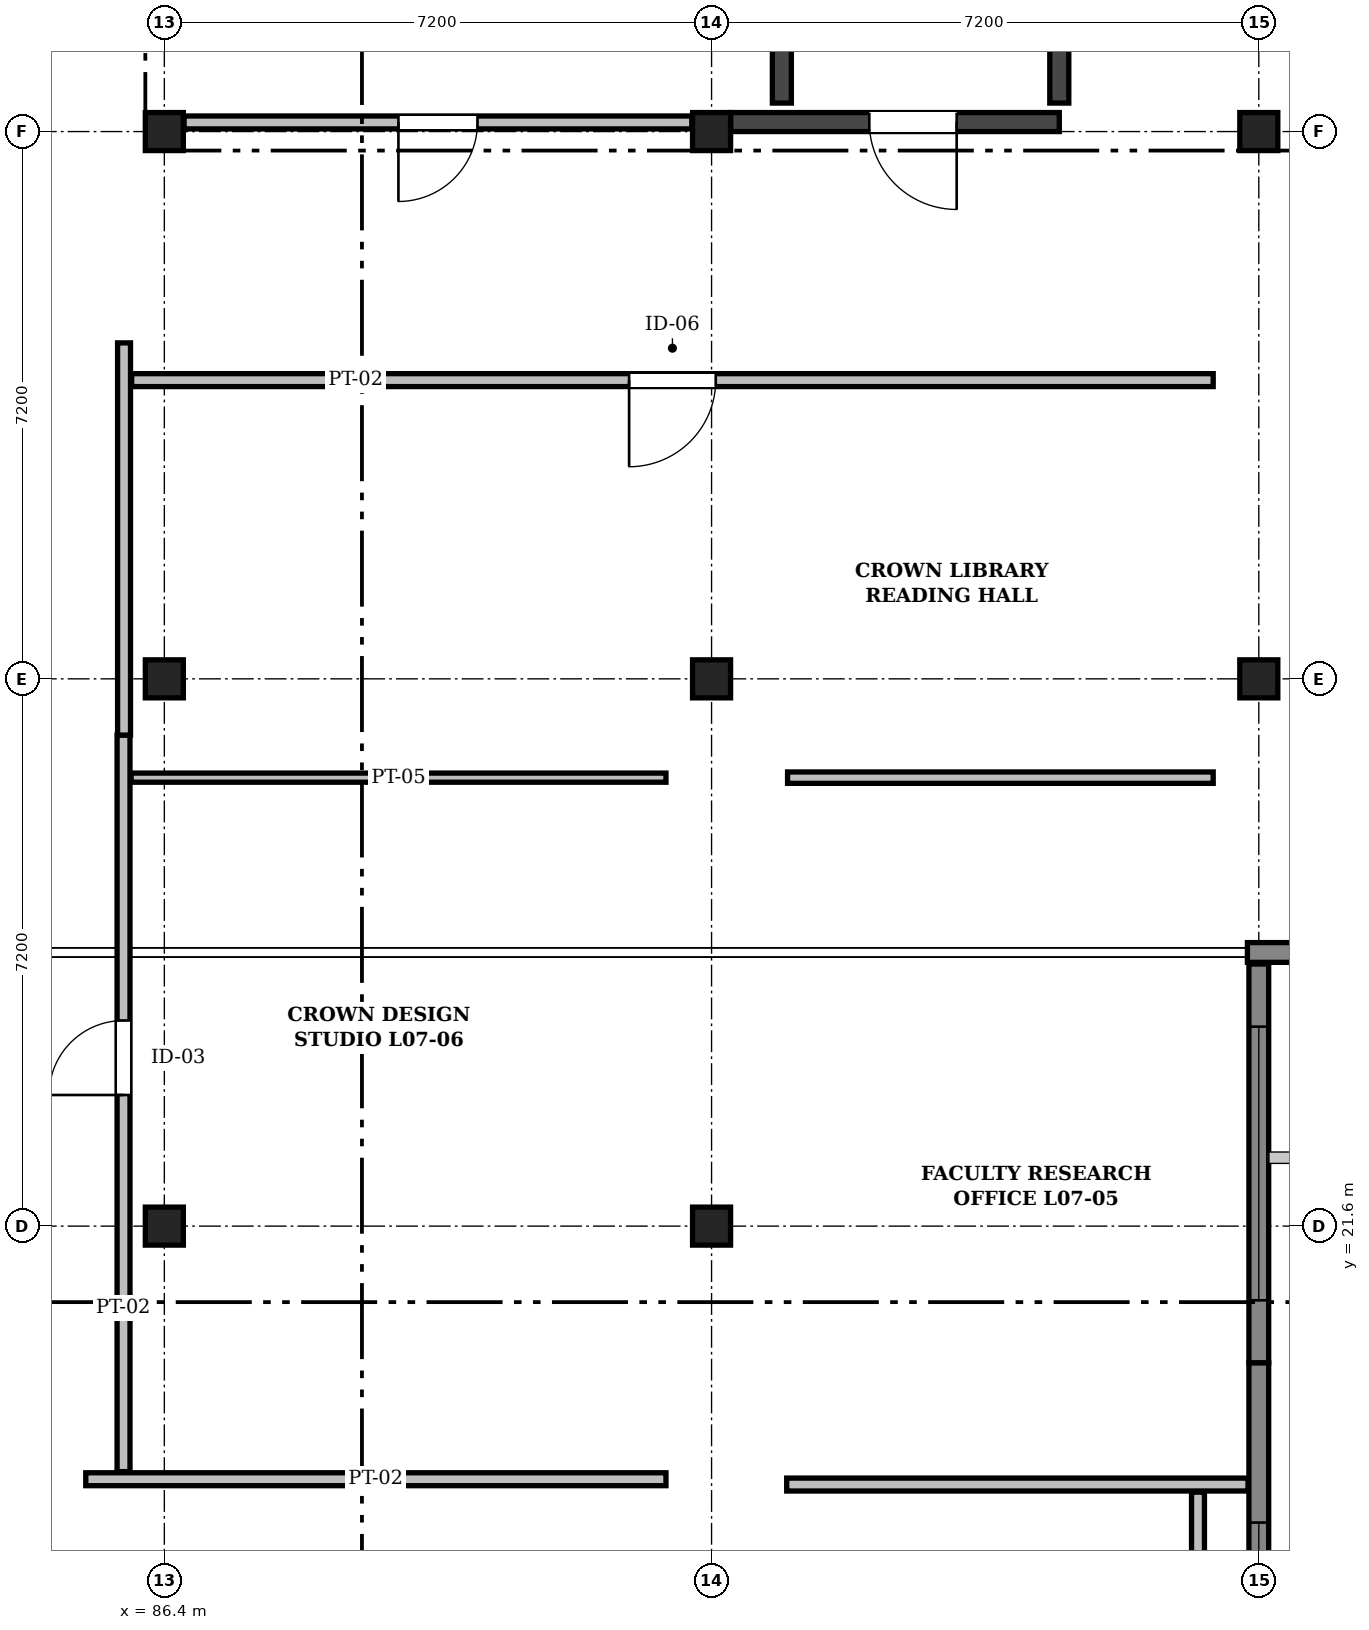
"""IFC4 building model, lengths in metres.
Left out: names, types, materials, properties, quantities, classifications, styles, units other than length and angle.
Written with IfcOpenShell. Run it as: python <this file> out.ifc"""

import sys

from ifc_helpers import new_model, si_unit, direction, frame, frame_2d, origin, origin_2d, place, context, subcontext, project, spatial, rectangle, extrude, element, fill, save


model = new_model("IFC4")
c1 = context("Model", 3, precision=1e-05, world=origin(), true_north=direction((0.0, 1.0)))
c2 = subcontext(c1, "Body", "Model", "MODEL_VIEW")
j1 = project(units=[si_unit("LENGTHUNIT", "METRE"), si_unit("PLANEANGLEUNIT", "RADIAN")], contexts=[c1])
p1 = place(None, origin())
s1 = spatial("IfcSite", under=j1, at=p1, CompositionType="ELEMENT")
p2 = place(p1, origin())
s2 = spatial("IfcBuilding", under=s1, at=p2, CompositionType="ELEMENT")
p3 = place(p2, frame((0.0, 0.0, 32.4)))
s3 = spatial("IfcBuildingStorey", under=s2, at=p3, CompositionType="ELEMENT", Elevation=32.4)
for number, where, z_axis, x_axis in (
    (1, (86.4, 21.6, 0.0), (0.0, 0.0, 1.0), (1.0, 0.0, 0.0)),
    (2, (86.4, 28.8, 0.0), (0.0, 0.0, 1.0), (1.0, 0.0, 0.0)),
    (3, (86.4, 36.0, 0.0), (0.0, 0.0, 1.0), (1.0, 0.0, 0.0)),
    (4, (93.6, 21.6, 0.0), (0.0, 0.0, 1.0), (1.0, 0.0, 0.0)),
    (5, (93.6, 28.8, 0.0), (0.0, 0.0, 1.0), (1.0, 0.0, 0.0)),
    (6, (93.6, 36.0, 0.0), (0.0, 0.0, 1.0), (1.0, 0.0, 0.0)),
    (7, (100.8, 28.8, 0.0), (0.0, 0.0, 1.0), (1.0, 0.0, 0.0)),
    (8, (100.8, 36.0, 0.0), (0.0, 0.0, 1.0), (1.0, 0.0, 0.0)),
):
    element("IfcColumn", number, at=place(p3, frame(where, z_axis=z_axis, x_axis=x_axis)), inside=s3, PredefinedType="COLUMN", context=c2, shape_type="SweptSolid", body=[
        extrude(rectangle(XDim=0.5, YDim=0.5, at=origin_2d()), origin(), (0.0, 0.0, 1.0), 4.5),
    ])
p4 = place(p3, frame((104.55, 25.2, 0.0), z_axis=(0.0, 0.0, 1.0), x_axis=(-1.0, 0.0, 0.0)))
e9 = element("IfcWall", 9, at=p4, inside=s3, PredefinedType="SOLIDWALL", context=c2, shape_type="SweptSolid", body=[
    extrude(rectangle(XDim=3.9, YDim=0.26, at=frame_2d((1.95, 0.0))), origin(), (0.0, 0.0, 1.0), 4.22),
])
p5 = place(p3, frame((100.8, 25.048, 0.0), z_axis=(0.0, 0.0, 1.0), x_axis=(0.0, -1.0, 0.0)))
e10 = element("IfcWall", 10, at=p5, inside=s3, PredefinedType="SOLIDWALL", context=c2, shape_type="SweptSolid", body=[
    extrude(rectangle(XDim=5.248, YDim=0.26, at=frame_2d((2.624, 0.0))), origin(), (0.0, 0.0, 1.0), 4.22),
])
p6 = place(p5, frame((0.824, 0.0, 0.95)))
e11 = element("IfcOpeningElement", 11, at=p6, cuts=e10, PredefinedType="OPENING", context=c2, shape_type="SweptSolid", body=[
    extrude(rectangle(XDim=3.6, YDim=1.55, at=frame_2d((1.8, 0.775))), frame((0.0, 0.142, 0.0), z_axis=(0.0, -1.0, 0.0), x_axis=(1.0, 0.0, 0.0)), (0.0, 0.0, 1.0), 0.284),
])
p7 = place(p3, frame((100.8, 19.8, 0.0), z_axis=(0.0, 0.0, 1.0), x_axis=(0.0, -1.0, 0.0)))
e12 = element("IfcWall", 12, at=p7, inside=s3, PredefinedType="SOLIDWALL", context=c2, shape_type="SweptSolid", body=[
    extrude(rectangle(XDim=5.4, YDim=0.26, at=frame_2d((2.7, 0.0))), origin(), (0.0, 0.0, 1.0), 4.22),
])
p8 = place(p7, frame((2.1, 0.0, 0.95)))
e13 = element("IfcOpeningElement", 13, at=p8, cuts=e12, PredefinedType="OPENING", context=c2, shape_type="SweptSolid", body=[
    extrude(rectangle(XDim=1.2, YDim=1.8, at=frame_2d((0.6, 0.9))), frame((0.0, 0.142, 0.0), z_axis=(0.0, -1.0, 0.0), x_axis=(1.0, 0.0, 0.0)), (0.0, 0.0, 1.0), 0.284),
])
p9 = place(p3, frame((93.85, 36.125, 0.0), z_axis=(0.0, 0.0, 1.0), x_axis=(1.0, 0.0, 0.0)))
e14 = element("IfcWall", 14, at=p9, inside=s3, PredefinedType="SHEAR", context=c2, shape_type="SweptSolid", body=[
    extrude(rectangle(XDim=4.325, YDim=0.25, at=frame_2d((2.163, 0.0))), origin(), (0.0, 0.0, 1.0), 4.25),
])
p10 = place(p9, frame((1.825, 0.0, 0.0)))
e15 = element("IfcOpeningElement", 15, at=p10, cuts=e14, PredefinedType="OPENING", context=c2, shape_type="SweptSolid", body=[
    extrude(rectangle(XDim=1.15, YDim=2.15, at=frame_2d((0.575, 1.075))), frame((0.0, 0.137, 0.0), z_axis=(0.0, -1.0, 0.0), x_axis=(1.0, 0.0, 0.0)), (0.0, 0.0, 1.0), 0.274),
])
p11 = place(p3, frame((94.525, 36.375, 0.0), z_axis=(0.0, 0.0, 1.0), x_axis=(0.0, 1.0, 0.0)))
e16 = element("IfcWall", 16, at=p11, inside=s3, PredefinedType="SHEAR", context=c2, shape_type="SweptSolid", body=[
    extrude(rectangle(XDim=2.77, YDim=0.25, at=frame_2d((1.385, 0.0))), origin(), (0.0, 0.0, 1.0), 4.25),
])
p12 = place(p3, frame((98.175, 36.375, 0.0), z_axis=(0.0, 0.0, 1.0), x_axis=(0.0, 1.0, 0.0)))
e17 = element("IfcWall", 17, at=p12, inside=s3, PredefinedType="SHEAR", context=c2, shape_type="SweptSolid", body=[
    extrude(rectangle(XDim=3.225, YDim=0.25, at=frame_2d((1.613, 0.0))), origin(), (0.0, 0.0, 1.0), 4.25),
])
p13 = place(p3, frame((94.588, 18.2, 0.0), z_axis=(0.0, 0.0, 1.0), x_axis=(1.0, 0.0, 0.0)))
e18 = element("IfcWall", 18, at=p13, inside=s3, PredefinedType="PARTITIONING", context=c2, shape_type="SweptSolid", body=[
    extrude(rectangle(XDim=6.07, YDim=0.17, at=frame_2d((3.035, 0.0))), origin(), (0.0, 0.0, 1.0), 4.16),
])
p14 = place(p3, frame((100.0, 14.36, 0.0), z_axis=(0.0, 0.0, 1.0), x_axis=(0.0, 1.0, 0.0)))
e19 = element("IfcWall", 19, at=p14, inside=s3, PredefinedType="PARTITIONING", context=c2, shape_type="SweptSolid", body=[
    extrude(rectangle(XDim=3.74, YDim=0.17, at=frame_2d((1.87, 0.0))), origin(), (0.0, 0.0, 1.0), 4.16),
])
p15 = place(p14, frame((1.62, 0.0, 0.0)))
e20 = element("IfcOpeningElement", 20, at=p15, cuts=e19, PredefinedType="OPENING", context=c2, shape_type="SweptSolid", body=[
    extrude(rectangle(XDim=0.9, YDim=2.08, at=frame_2d((0.45, 1.04))), frame((0.0, 0.097, 0.0), z_axis=(0.0, -1.0, 0.0), x_axis=(1.0, 0.0, 0.0)), (0.0, 0.0, 1.0), 0.194),
])
p16 = place(p3, frame((85.366, 18.27, 0.0), z_axis=(0.0, 0.0, 1.0), x_axis=(1.0, 0.0, 0.0)))
e21 = element("IfcWall", 21, at=p16, inside=s3, PredefinedType="PARTITIONING", context=c2, shape_type="SweptSolid", body=[
    extrude(rectangle(XDim=7.634, YDim=0.17, at=frame_2d((3.817, 0.0))), origin(), (0.0, 0.0, 1.0), 4.16),
])
p17 = place(p3, frame((85.863, 18.37, 0.0), z_axis=(0.0, 0.0, 1.0), x_axis=(0.0, 1.0, 0.0)))
e22 = element("IfcWall", 22, at=p17, inside=s3, PredefinedType="PARTITIONING", context=c2, shape_type="SweptSolid", body=[
    extrude(rectangle(XDim=9.69, YDim=0.17, at=frame_2d((4.845, 0.0))), origin(), (0.0, 0.0, 1.0), 4.16),
])
p18 = place(p17, frame((4.955, 0.0, 0.0)))
e23 = element("IfcOpeningElement", 23, at=p18, cuts=e22, PredefinedType="OPENING", context=c2, shape_type="SweptSolid", body=[
    extrude(rectangle(XDim=0.98, YDim=2.14, at=frame_2d((0.49, 1.07))), frame((0.0, 0.097, 0.0), z_axis=(0.0, -1.0, 0.0), x_axis=(1.0, 0.0, 0.0)), (0.0, 0.0, 1.0), 0.194),
])
p19 = place(p3, frame((85.87, 28.06, 0.0), z_axis=(0.0, 0.0, 1.0), x_axis=(0.0, 1.0, 0.0)))
e24 = element("IfcWall", 24, at=p19, inside=s3, PredefinedType="PARTITIONING", context=c2, shape_type="SweptSolid", body=[
    extrude(rectangle(XDim=5.16, YDim=0.17, at=frame_2d((2.58, 0.0))), origin(), (0.0, 0.0, 1.0), 4.16),
])
p20 = place(p3, frame((86.66, 36.12, 0.0), z_axis=(0.0, 0.0, 1.0), x_axis=(1.0, 0.0, 0.0)))
e25 = element("IfcWall", 25, at=p20, inside=s3, PredefinedType="PARTITIONING", context=c2, shape_type="SweptSolid", body=[
    extrude(rectangle(XDim=6.68, YDim=0.17, at=frame_2d((3.34, 0.0))), origin(), (0.0, 0.0, 1.0), 3.78),
])
p21 = place(p20, frame((2.82, 0.0, 0.0)))
e26 = element("IfcOpeningElement", 26, at=p21, cuts=e25, PredefinedType="OPENING", context=c2, shape_type="SweptSolid", body=[
    extrude(rectangle(XDim=1.04, YDim=2.18, at=frame_2d((0.52, 1.09))), frame((0.0, 0.097, 0.0), z_axis=(0.0, -1.0, 0.0), x_axis=(1.0, 0.0, 0.0)), (0.0, 0.0, 1.0), 0.194),
])
p22 = place(p3, frame((85.97, 32.73, 0.0), z_axis=(0.0, 0.0, 1.0), x_axis=(1.0, 0.0, 0.0)))
e27 = element("IfcWall", 27, at=p22, inside=s3, PredefinedType="PARTITIONING", context=c2, shape_type="SweptSolid", body=[
    extrude(rectangle(XDim=14.23, YDim=0.17, at=frame_2d((7.115, 0.0))), origin(), (0.0, 0.0, 1.0), 4.16),
])
p23 = place(p22, frame((6.545, 0.0, 0.0)))
e28 = element("IfcOpeningElement", 28, at=p23, cuts=e27, PredefinedType="OPENING", context=c2, shape_type="SweptSolid", body=[
    extrude(rectangle(XDim=1.14, YDim=2.2, at=frame_2d((0.57, 1.1))), frame((0.0, 0.097, 0.0), z_axis=(0.0, -1.0, 0.0), x_axis=(1.0, 0.0, 0.0)), (0.0, 0.0, 1.0), 0.194),
])
p24 = place(p3, frame((94.6, 27.5, 0.0), z_axis=(0.0, 0.0, 1.0), x_axis=(1.0, 0.0, 0.0)))
e29 = element("IfcWall", 29, at=p24, inside=s3, PredefinedType="PARTITIONING", context=c2, shape_type="SweptSolid", body=[
    extrude(rectangle(XDim=5.6, YDim=0.15, at=frame_2d((2.8, 0.0))), origin(), (0.0, 0.0, 1.0), 4.16),
])
p25 = place(p3, frame((85.963, 27.5, 0.0), z_axis=(0.0, 0.0, 1.0), x_axis=(1.0, 0.0, 0.0)))
e30 = element("IfcWall", 30, at=p25, inside=s3, PredefinedType="PARTITIONING", context=c2, shape_type="SweptSolid", body=[
    extrude(rectangle(XDim=7.037, YDim=0.12, at=frame_2d((3.519, 0.0))), origin(), (0.0, 0.0, 1.0), 4.16),
])
p26 = place(p6, origin())
e31 = element("IfcWindow", 31, at=p26, inside=s3, PartitioningType="SINGLE_PANEL", PredefinedType="WINDOW", context=c2, shape_type="SweptSolid", body=[
    extrude(rectangle(XDim=3.6, YDim=1.55, at=frame_2d((1.8, 0.775))), frame((0.0, 0.03, 0.0), z_axis=(0.0, -1.0, 0.0), x_axis=(1.0, 0.0, 0.0)), (0.0, 0.0, 1.0), 0.06),
])
fill(e11, e31)
p27 = place(p8, origin())
e32 = element("IfcWindow", 32, at=p27, inside=s3, PartitioningType="SINGLE_PANEL", PredefinedType="WINDOW", context=c2, shape_type="SweptSolid", body=[
    extrude(rectangle(XDim=1.2, YDim=1.8, at=frame_2d((0.6, 0.9))), frame((0.0, 0.03, 0.0), z_axis=(0.0, -1.0, 0.0), x_axis=(1.0, 0.0, 0.0)), (0.0, 0.0, 1.0), 0.06),
])
fill(e13, e32)
p28 = place(p10, frame((1.15, 0.0, 0.0), z_axis=(0.0, 0.0, 1.0), x_axis=(-1.0, 0.0, 0.0)))
e33 = element("IfcDoor", 33, at=p28, inside=s3, OperationType="SINGLE_SWING_LEFT", PredefinedType="DOOR", context=c2, shape_type="SweptSolid", body=[
    extrude(rectangle(XDim=1.15, YDim=2.15, at=frame_2d((0.575, 1.075))), frame((0.0, 0.025, 0.0), z_axis=(0.0, -1.0, 0.0), x_axis=(1.0, 0.0, 0.0)), (0.0, 0.0, 1.0), 0.05),
])
fill(e15, e33)
p29 = place(p18, origin())
e34 = element("IfcDoor", 34, at=p29, inside=s3, OperationType="SINGLE_SWING_LEFT", PredefinedType="DOOR", context=c2, shape_type="SweptSolid", body=[
    extrude(rectangle(XDim=0.98, YDim=2.14, at=frame_2d((0.49, 1.07))), frame((0.0, 0.025, 0.0), z_axis=(0.0, -1.0, 0.0), x_axis=(1.0, 0.0, 0.0)), (0.0, 0.0, 1.0), 0.05),
])
fill(e23, e34)
p30 = place(p21, frame((1.04, 0.0, 0.0), z_axis=(0.0, 0.0, 1.0), x_axis=(-1.0, 0.0, 0.0)))
e35 = element("IfcDoor", 35, at=p30, inside=s3, OperationType="SINGLE_SWING_RIGHT", PredefinedType="DOOR", context=c2, shape_type="SweptSolid", body=[
    extrude(rectangle(XDim=1.04, YDim=2.18, at=frame_2d((0.52, 1.09))), frame((0.0, 0.025, 0.0), z_axis=(0.0, -1.0, 0.0), x_axis=(1.0, 0.0, 0.0)), (0.0, 0.0, 1.0), 0.05),
])
fill(e26, e35)
p31 = place(p23, frame((1.14, 0.0, 0.0), z_axis=(0.0, 0.0, 1.0), x_axis=(-1.0, 0.0, 0.0)))
e36 = element("IfcDoor", 36, at=p31, inside=s3, OperationType="SINGLE_SWING_RIGHT", PredefinedType="DOOR", context=c2, shape_type="SweptSolid", body=[
    extrude(rectangle(XDim=1.14, YDim=2.2, at=frame_2d((0.57, 1.1))), frame((0.0, 0.025, 0.0), z_axis=(0.0, -1.0, 0.0), x_axis=(1.0, 0.0, 0.0)), (0.0, 0.0, 1.0), 0.05),
])
fill(e28, e36)
save(model, sys.argv[1])
